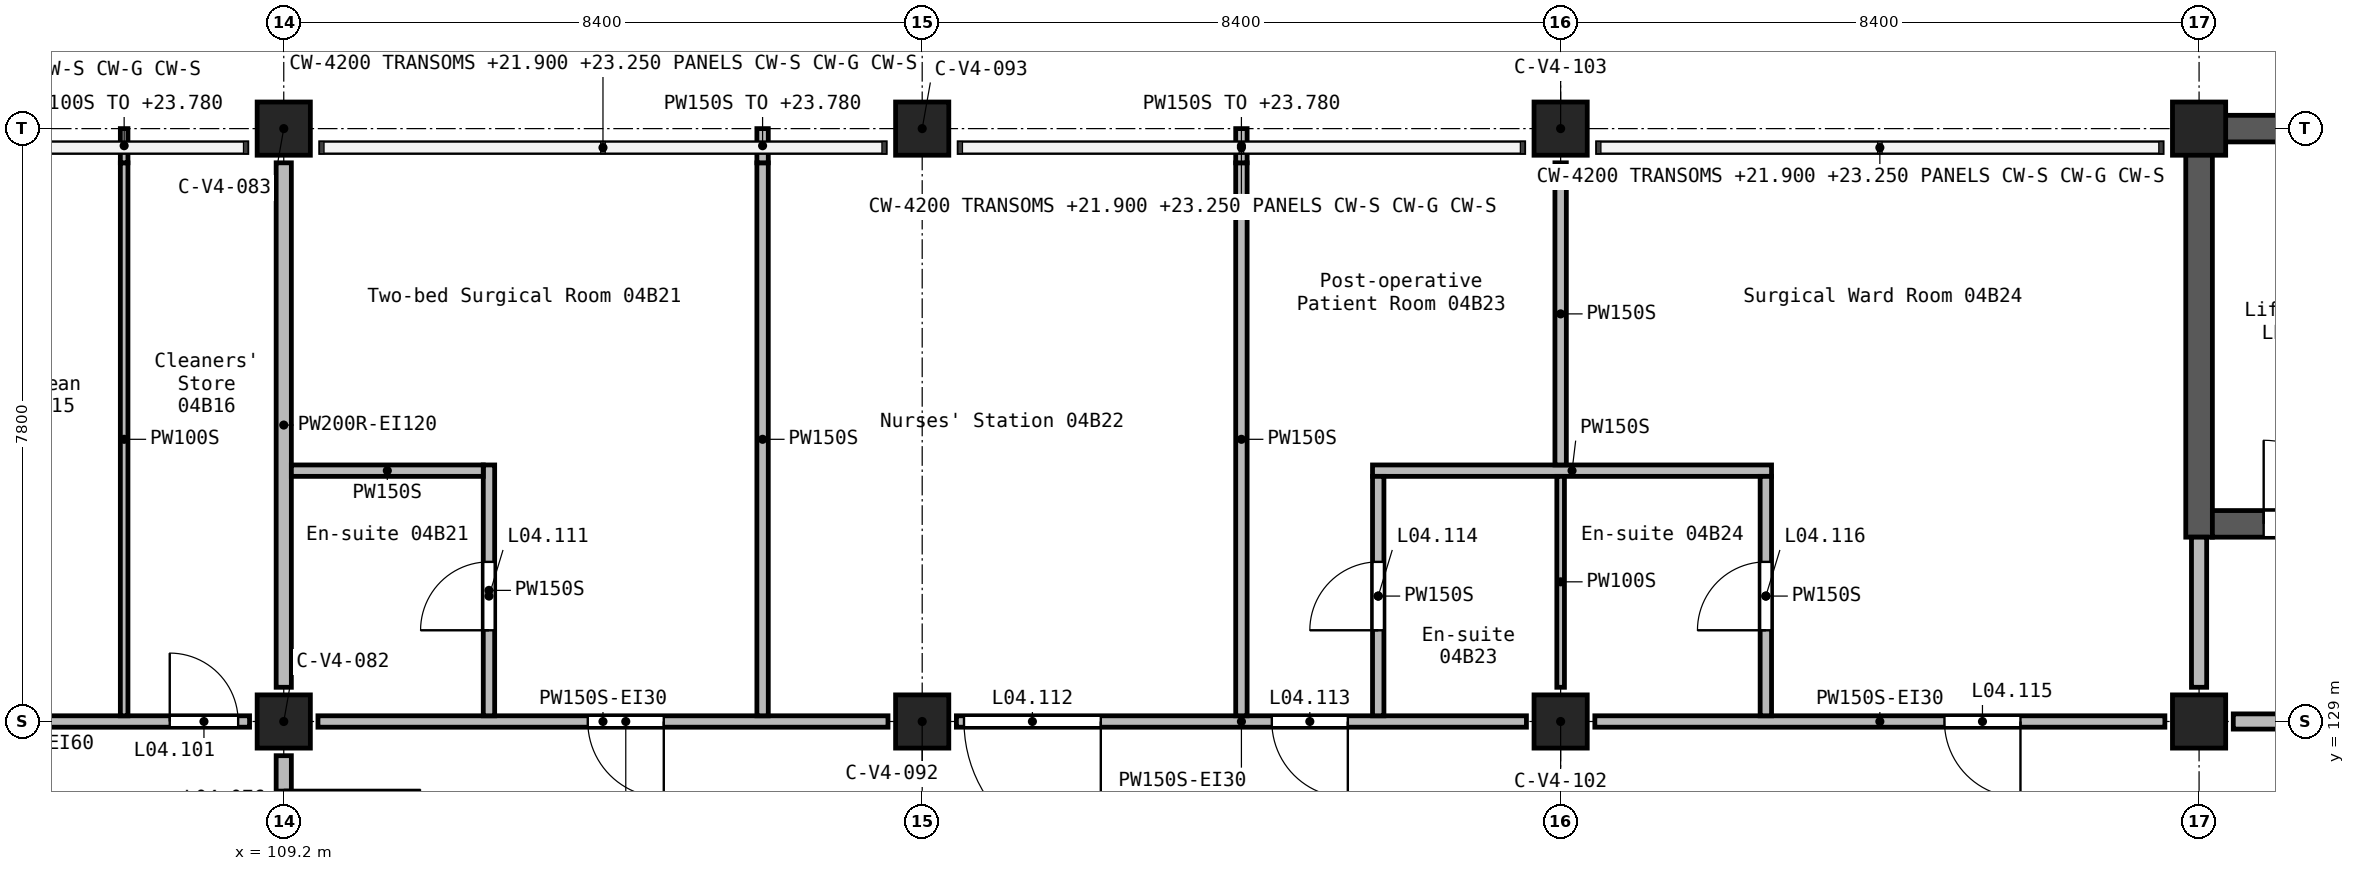
"""IFC4 building model, lengths in metres.
Left out: names, types, materials, properties, quantities, classifications, styles, units other than length and angle.
Written with IfcOpenShell. Run it as: python <this file> out.ifc"""

import sys

from ifc_helpers import new_model, si_unit, direction, frame, frame_2d, origin, origin_2d, place, context, subcontext, project, spatial, rectangle, extrude, element, fill, save


model = new_model("IFC4")
c1 = context("Model", 3, precision=1e-05, world=origin(), true_north=direction((0.0, 1.0)))
c2 = subcontext(c1, "Body", "Model", "MODEL_VIEW")
j1 = project(units=[si_unit("LENGTHUNIT", "METRE"), si_unit("PLANEANGLEUNIT", "RADIAN")], contexts=[c1])
p1 = place(None, origin())
s1 = spatial("IfcSite", under=j1, at=p1, CompositionType="ELEMENT")
p2 = place(p1, origin())
s2 = spatial("IfcBuilding", under=s1, at=p2, CompositionType="ELEMENT")
p3 = place(p2, frame((0.0, 0.0, 21.0)))
s3 = spatial("IfcBuildingStorey", under=s2, at=p3, CompositionType="ELEMENT", Elevation=21.0)
for number, where, z_axis, x_axis in (
    (1, (109.2, 129.0, 0.0), (0.0, 0.0, 1.0), (1.0, 0.0, 0.0)),
    (2, (109.2, 136.8, 0.0), (0.0, 0.0, 1.0), (1.0, 0.0, 0.0)),
    (3, (117.6, 129.0, 0.0), (0.0, 0.0, 1.0), (1.0, 0.0, 0.0)),
    (4, (117.6, 136.8, 0.0), (0.0, 0.0, 1.0), (1.0, 0.0, 0.0)),
    (5, (126.0, 129.0, 0.0), (0.0, 0.0, 1.0), (1.0, 0.0, 0.0)),
    (6, (126.0, 136.8, 0.0), (0.0, 0.0, 1.0), (1.0, 0.0, 0.0)),
    (7, (134.4, 129.0, 0.0), (0.0, 0.0, 1.0), (1.0, 0.0, 0.0)),
    (8, (134.4, 136.8, 0.0), (0.0, 0.0, 1.0), (1.0, 0.0, 0.0)),
):
    element("IfcColumn", number, at=place(p3, frame(where, z_axis=z_axis, x_axis=x_axis)), inside=s3, PredefinedType="COLUMN", context=c2, shape_type="SweptSolid", body=[
        extrude(rectangle(XDim=0.7, YDim=0.7, at=origin_2d()), origin(), (0.0, 0.0, 1.0), 3.9),
    ])
p4 = place(p3, frame((134.225, 136.8, 0.0), z_axis=(0.0, 0.0, 1.0), x_axis=(1.0, 0.0, 0.0)))
e9 = element("IfcWall", 9, at=p4, inside=s3, PredefinedType="SHEAR", context=c2, shape_type="SweptSolid", body=[
    extrude(rectangle(XDim=2.975, YDim=0.35, at=frame_2d((1.487, 0.0))), origin(), (0.0, 0.0, 1.0), 3.9),
])
p5 = place(p3, frame((134.4, 131.425, 0.0), z_axis=(0.0, 0.0, 1.0), x_axis=(0.0, 1.0, 0.0)))
e10 = element("IfcWall", 10, at=p5, inside=s3, PredefinedType="SHEAR", context=c2, shape_type="SweptSolid", body=[
    extrude(rectangle(XDim=5.2, YDim=0.35, at=frame_2d((2.6, 0.0))), origin(), (0.0, 0.0, 1.0), 3.9),
])
p6 = place(p3, frame((134.575, 131.6, 0.0), z_axis=(0.0, 0.0, 1.0), x_axis=(1.0, 0.0, 0.0)))
e11 = element("IfcWall", 11, at=p6, inside=s3, PredefinedType="SHEAR", context=c2, shape_type="SweptSolid", body=[
    extrude(rectangle(XDim=2.625, YDim=0.35, at=frame_2d((1.312, 0.0))), origin(), (0.0, 0.0, 1.0), 3.9),
])
p7 = place(p6, frame((0.675, 0.0, 0.0)))
e12 = element("IfcOpeningElement", 12, at=p7, cuts=e11, PredefinedType="OPENING", context=c2, shape_type="SweptSolid", body=[
    extrude(rectangle(XDim=1.1, YDim=2.1, at=frame_2d((0.55, 1.05))), frame((0.0, 0.185, 0.0), z_axis=(0.0, -1.0, 0.0), x_axis=(1.0, 0.0, 0.0)), (0.0, 0.0, 1.0), 0.37),
])
p8 = place(p3, frame((109.2, 136.35, 0.0), z_axis=(0.0, 0.0, 1.0), x_axis=(0.0, -1.0, 0.0)))
e13 = element("IfcWall", 13, at=p8, inside=s3, PredefinedType="SOLIDWALL", context=c2, shape_type="SweptSolid", body=[
    extrude(rectangle(XDim=6.9, YDim=0.2, at=frame_2d((3.45, 0.0))), origin(), (0.0, 0.0, 1.0), 3.6),
])
p9 = place(p3, frame((109.2, 128.55, 0.0), z_axis=(0.0, 0.0, 1.0), x_axis=(0.0, -1.0, 0.0)))
e14 = element("IfcWall", 14, at=p9, inside=s3, PredefinedType="SOLIDWALL", context=c2, shape_type="SweptSolid", body=[
    extrude(rectangle(XDim=2.7, YDim=0.2, at=frame_2d((1.35, 0.0))), origin(), (0.0, 0.0, 1.0), 3.6),
])
p10 = place(p9, frame((0.45, 0.0, 0.0)))
e15 = element("IfcOpeningElement", 15, at=p10, cuts=e14, PredefinedType="OPENING", context=c2, shape_type="SweptSolid", body=[
    extrude(rectangle(XDim=1.8, YDim=2.1, at=frame_2d((0.9, 1.05))), frame((0.0, 0.11, 0.0), z_axis=(0.0, -1.0, 0.0), x_axis=(1.0, 0.0, 0.0)), (0.0, 0.0, 1.0), 0.22),
])
p11 = place(p3, frame((134.85, 129.0, 0.0), z_axis=(0.0, 0.0, 1.0), x_axis=(1.0, 0.0, 0.0)))
e16 = element("IfcWall", 16, at=p11, inside=s3, PredefinedType="SOLIDWALL", context=c2, shape_type="SweptSolid", body=[
    extrude(rectangle(XDim=7.5, YDim=0.2, at=frame_2d((3.75, 0.0))), origin(), (0.0, 0.0, 1.0), 3.6),
])
p12 = place(p11, frame((2.85, 0.0, 0.0)))
e17 = element("IfcOpeningElement", 17, at=p12, cuts=e16, PredefinedType="OPENING", context=c2, shape_type="SweptSolid", body=[
    extrude(rectangle(XDim=1.8, YDim=2.1, at=frame_2d((0.9, 1.05))), frame((0.0, 0.11, 0.0), z_axis=(0.0, -1.0, 0.0), x_axis=(1.0, 0.0, 0.0)), (0.0, 0.0, 1.0), 0.22),
])
p13 = place(p3, frame((134.4, 129.45, 0.0), z_axis=(0.0, 0.0, 1.0), x_axis=(0.0, 1.0, 0.0)))
e18 = element("IfcWall", 18, at=p13, inside=s3, PredefinedType="SOLIDWALL", context=c2, shape_type="SweptSolid", body=[
    extrude(rectangle(XDim=1.975, YDim=0.2, at=frame_2d((0.988, 0.0))), origin(), (0.0, 0.0, 1.0), 3.6),
])
p14 = place(p3, frame((133.95, 129.0, 0.0), z_axis=(0.0, 0.0, 1.0), x_axis=(-1.0, 0.0, 0.0)))
e19 = element("IfcWall", 19, at=p14, inside=s3, PredefinedType="PARTITIONING", context=c2, shape_type="SweptSolid", body=[
    extrude(rectangle(XDim=7.5, YDim=0.15, at=frame_2d((3.75, 0.0))), origin(), (0.0, 0.0, 1.0), 3.6),
])
p15 = place(p14, frame((1.9, 0.0, 0.0)))
e20 = element("IfcOpeningElement", 20, at=p15, cuts=e19, PredefinedType="OPENING", context=c2, shape_type="SweptSolid", body=[
    extrude(rectangle(XDim=1.0, YDim=2.1, at=frame_2d((0.5, 1.05))), frame((0.0, 0.085, 0.0), z_axis=(0.0, -1.0, 0.0), x_axis=(1.0, 0.0, 0.0)), (0.0, 0.0, 1.0), 0.17),
])
p16 = place(p3, frame((125.55, 129.0, 0.0), z_axis=(0.0, 0.0, 1.0), x_axis=(-1.0, 0.0, 0.0)))
e21 = element("IfcWall", 21, at=p16, inside=s3, PredefinedType="PARTITIONING", context=c2, shape_type="SweptSolid", body=[
    extrude(rectangle(XDim=7.5, YDim=0.15, at=frame_2d((3.75, 0.0))), origin(), (0.0, 0.0, 1.0), 3.6),
])
p17 = place(p16, frame((5.6, 0.0, 0.0)))
e22 = element("IfcOpeningElement", 22, at=p17, cuts=e21, PredefinedType="OPENING", context=c2, shape_type="SweptSolid", body=[
    extrude(rectangle(XDim=1.8, YDim=2.1, at=frame_2d((0.9, 1.05))), frame((0.0, 0.085, 0.0), z_axis=(0.0, -1.0, 0.0), x_axis=(1.0, 0.0, 0.0)), (0.0, 0.0, 1.0), 0.17),
])
p18 = place(p16, frame((2.35, 0.0, 0.0)))
e23 = element("IfcOpeningElement", 23, at=p18, cuts=e21, PredefinedType="OPENING", context=c2, shape_type="SweptSolid", body=[
    extrude(rectangle(XDim=1.0, YDim=2.1, at=frame_2d((0.5, 1.05))), frame((0.0, 0.085, 0.0), z_axis=(0.0, -1.0, 0.0), x_axis=(1.0, 0.0, 0.0)), (0.0, 0.0, 1.0), 0.17),
])
p19 = place(p3, frame((117.15, 129.0, 0.0), z_axis=(0.0, 0.0, 1.0), x_axis=(-1.0, 0.0, 0.0)))
e24 = element("IfcWall", 24, at=p19, inside=s3, PredefinedType="PARTITIONING", context=c2, shape_type="SweptSolid", body=[
    extrude(rectangle(XDim=7.5, YDim=0.15, at=frame_2d((3.75, 0.0))), origin(), (0.0, 0.0, 1.0), 3.6),
])
p20 = place(p19, frame((2.95, 0.0, 0.0)))
e25 = element("IfcOpeningElement", 25, at=p20, cuts=e24, PredefinedType="OPENING", context=c2, shape_type="SweptSolid", body=[
    extrude(rectangle(XDim=1.0, YDim=2.1, at=frame_2d((0.5, 1.05))), frame((0.0, 0.085, 0.0), z_axis=(0.0, -1.0, 0.0), x_axis=(1.0, 0.0, 0.0)), (0.0, 0.0, 1.0), 0.17),
])
p21 = place(p3, frame((102.975, 129.0, 0.0), z_axis=(0.0, 0.0, 1.0), x_axis=(1.0, 0.0, 0.0)))
e26 = element("IfcWall", 26, at=p21, inside=s3, PredefinedType="PARTITIONING", context=c2, shape_type="SweptSolid", body=[
    extrude(rectangle(XDim=5.775, YDim=0.15, at=frame_2d((2.887, 0.0))), origin(), (0.0, 0.0, 1.0), 3.6),
])
p22 = place(p21, frame((1.525, 0.0, 0.0)))
e27 = element("IfcOpeningElement", 27, at=p22, cuts=e26, PredefinedType="OPENING", context=c2, shape_type="SweptSolid", body=[
    extrude(rectangle(XDim=1.0, YDim=2.1, at=frame_2d((0.5, 1.05))), frame((0.0, 0.085, 0.0), z_axis=(0.0, -1.0, 0.0), x_axis=(1.0, 0.0, 0.0)), (0.0, 0.0, 1.0), 0.17),
])
p23 = place(p21, frame((4.725, 0.0, 0.0)))
e28 = element("IfcOpeningElement", 28, at=p23, cuts=e26, PredefinedType="OPENING", context=c2, shape_type="SweptSolid", body=[
    extrude(rectangle(XDim=0.9, YDim=2.1, at=frame_2d((0.45, 1.05))), frame((0.0, 0.085, 0.0), z_axis=(0.0, -1.0, 0.0), x_axis=(1.0, 0.0, 0.0)), (0.0, 0.0, 1.0), 0.17),
])
p24 = place(p3, frame((115.5, 129.075, 0.0), z_axis=(0.0, 0.0, 1.0), x_axis=(0.0, 1.0, 0.0)))
e29 = element("IfcWall", 29, at=p24, inside=s3, PredefinedType="PARTITIONING", context=c2, shape_type="SweptSolid", body=[
    extrude(rectangle(XDim=7.275, YDim=0.15, at=frame_2d((3.638, 0.0))), origin(), (0.0, 0.0, 1.0), 3.6),
])
p25 = place(p3, frame((115.5, 136.35, 0.0), z_axis=(0.0, 0.0, 1.0), x_axis=(0.0, 1.0, 0.0)))
e30 = element("IfcWall", 30, at=p25, inside=s3, PredefinedType="PARTITIONING", context=c2, shape_type="SweptSolid", body=[
    extrude(rectangle(XDim=0.45, YDim=0.15, at=frame_2d((0.225, 0.0))), origin(), (0.0, 0.0, 1.0), 2.78),
])
p26 = place(p3, frame((121.8, 129.075, 0.0), z_axis=(0.0, 0.0, 1.0), x_axis=(0.0, 1.0, 0.0)))
e31 = element("IfcWall", 31, at=p26, inside=s3, PredefinedType="PARTITIONING", context=c2, shape_type="SweptSolid", body=[
    extrude(rectangle(XDim=7.275, YDim=0.15, at=frame_2d((3.638, 0.0))), origin(), (0.0, 0.0, 1.0), 3.6),
])
p27 = place(p3, frame((121.8, 136.35, 0.0), z_axis=(0.0, 0.0, 1.0), x_axis=(0.0, 1.0, 0.0)))
e32 = element("IfcWall", 32, at=p27, inside=s3, PredefinedType="PARTITIONING", context=c2, shape_type="SweptSolid", body=[
    extrude(rectangle(XDim=0.45, YDim=0.15, at=frame_2d((0.225, 0.0))), origin(), (0.0, 0.0, 1.0), 2.78),
])
p28 = place(p3, frame((123.525, 132.3, 0.0), z_axis=(0.0, 0.0, 1.0), x_axis=(1.0, 0.0, 0.0)))
e33 = element("IfcWall", 33, at=p28, inside=s3, PredefinedType="PARTITIONING", context=c2, shape_type="SweptSolid", body=[
    extrude(rectangle(XDim=5.25, YDim=0.15, at=frame_2d((2.625, 0.0))), origin(), (0.0, 0.0, 1.0), 3.6),
])
p29 = place(p3, frame((126.0, 132.375, 0.0), z_axis=(0.0, 0.0, 1.0), x_axis=(0.0, 1.0, 0.0)))
e34 = element("IfcWall", 34, at=p29, inside=s3, PredefinedType="PARTITIONING", context=c2, shape_type="SweptSolid", body=[
    extrude(rectangle(XDim=3.975, YDim=0.15, at=frame_2d((1.988, 0.0))), origin(), (0.0, 0.0, 1.0), 3.6),
])
p30 = place(p3, frame((111.9, 129.075, 0.0), z_axis=(0.0, 0.0, 1.0), x_axis=(0.0, 1.0, 0.0)))
e35 = element("IfcWall", 35, at=p30, inside=s3, PredefinedType="PARTITIONING", context=c2, shape_type="SweptSolid", body=[
    extrude(rectangle(XDim=3.3, YDim=0.15, at=frame_2d((1.65, 0.0))), origin(), (0.0, 0.0, 1.0), 3.6),
])
p31 = place(p30, frame((1.125, 0.0, 0.0)))
e36 = element("IfcOpeningElement", 36, at=p31, cuts=e35, PredefinedType="OPENING", context=c2, shape_type="SweptSolid", body=[
    extrude(rectangle(XDim=0.9, YDim=2.1, at=frame_2d((0.45, 1.05))), frame((0.0, 0.085, 0.0), z_axis=(0.0, -1.0, 0.0), x_axis=(1.0, 0.0, 0.0)), (0.0, 0.0, 1.0), 0.17),
])
p32 = place(p3, frame((123.6, 129.075, 0.0), z_axis=(0.0, 0.0, 1.0), x_axis=(0.0, 1.0, 0.0)))
e37 = element("IfcWall", 37, at=p32, inside=s3, PredefinedType="PARTITIONING", context=c2, shape_type="SweptSolid", body=[
    extrude(rectangle(XDim=3.15, YDim=0.15, at=frame_2d((1.575, 0.0))), origin(), (0.0, 0.0, 1.0), 3.6),
])
p33 = place(p32, frame((1.125, 0.0, 0.0)))
e38 = element("IfcOpeningElement", 38, at=p33, cuts=e37, PredefinedType="OPENING", context=c2, shape_type="SweptSolid", body=[
    extrude(rectangle(XDim=0.9, YDim=2.1, at=frame_2d((0.45, 1.05))), frame((0.0, 0.085, 0.0), z_axis=(0.0, -1.0, 0.0), x_axis=(1.0, 0.0, 0.0)), (0.0, 0.0, 1.0), 0.17),
])
p34 = place(p3, frame((128.7, 129.075, 0.0), z_axis=(0.0, 0.0, 1.0), x_axis=(0.0, 1.0, 0.0)))
e39 = element("IfcWall", 39, at=p34, inside=s3, PredefinedType="PARTITIONING", context=c2, shape_type="SweptSolid", body=[
    extrude(rectangle(XDim=3.15, YDim=0.15, at=frame_2d((1.575, 0.0))), origin(), (0.0, 0.0, 1.0), 3.6),
])
p35 = place(p34, frame((1.125, 0.0, 0.0)))
e40 = element("IfcOpeningElement", 40, at=p35, cuts=e39, PredefinedType="OPENING", context=c2, shape_type="SweptSolid", body=[
    extrude(rectangle(XDim=0.9, YDim=2.1, at=frame_2d((0.45, 1.05))), frame((0.0, 0.085, 0.0), z_axis=(0.0, -1.0, 0.0), x_axis=(1.0, 0.0, 0.0)), (0.0, 0.0, 1.0), 0.17),
])
p36 = place(p3, frame((109.3, 132.3, 0.0), z_axis=(0.0, 0.0, 1.0), x_axis=(1.0, 0.0, 0.0)))
e41 = element("IfcWall", 41, at=p36, inside=s3, PredefinedType="PARTITIONING", context=c2, shape_type="SweptSolid", body=[
    extrude(rectangle(XDim=2.525, YDim=0.15, at=frame_2d((1.262, 0.0))), origin(), (0.0, 0.0, 1.0), 3.6),
])
p37 = place(p3, frame((107.1, 129.075, 0.0), z_axis=(0.0, 0.0, 1.0), x_axis=(0.0, 1.0, 0.0)))
e42 = element("IfcWall", 42, at=p37, inside=s3, PredefinedType="PARTITIONING", context=c2, shape_type="SweptSolid", body=[
    extrude(rectangle(XDim=7.275, YDim=0.1, at=frame_2d((3.638, 0.0))), origin(), (0.0, 0.0, 1.0), 3.6),
])
p38 = place(p3, frame((107.1, 136.35, 0.0), z_axis=(0.0, 0.0, 1.0), x_axis=(0.0, 1.0, 0.0)))
e43 = element("IfcWall", 43, at=p38, inside=s3, PredefinedType="PARTITIONING", context=c2, shape_type="SweptSolid", body=[
    extrude(rectangle(XDim=0.45, YDim=0.1, at=frame_2d((0.225, 0.0))), origin(), (0.0, 0.0, 1.0), 2.78),
])
p39 = place(p3, frame((126.0, 129.45, 0.0), z_axis=(0.0, 0.0, 1.0), x_axis=(0.0, 1.0, 0.0)))
e44 = element("IfcWall", 44, at=p39, inside=s3, PredefinedType="PARTITIONING", context=c2, shape_type="SweptSolid", body=[
    extrude(rectangle(XDim=2.775, YDim=0.1, at=frame_2d((1.388, 0.0))), origin(), (0.0, 0.0, 1.0), 3.6),
])
p40 = place(p10, origin())
e45 = element("IfcDoor", 45, at=p40, inside=s3, OperationType="DOUBLE_DOOR_SINGLE_SWING", PredefinedType="DOOR", context=c2, shape_type="SweptSolid", body=[
    extrude(rectangle(XDim=1.8, YDim=2.1, at=frame_2d((0.9, 1.05))), frame((0.0, 0.025, 0.0), z_axis=(0.0, -1.0, 0.0), x_axis=(1.0, 0.0, 0.0)), (0.0, 0.0, 1.0), 0.05),
])
fill(e15, e45)
p41 = place(p23, origin())
e46 = element("IfcDoor", 46, at=p41, inside=s3, OperationType="SINGLE_SWING_RIGHT", PredefinedType="DOOR", context=c2, shape_type="SweptSolid", body=[
    extrude(rectangle(XDim=0.9, YDim=2.1, at=frame_2d((0.45, 1.05))), frame((0.0, 0.025, 0.0), z_axis=(0.0, -1.0, 0.0), x_axis=(1.0, 0.0, 0.0)), (0.0, 0.0, 1.0), 0.05),
])
fill(e28, e46)
p42 = place(p20, frame((1.0, 0.0, 0.0), z_axis=(0.0, 0.0, 1.0), x_axis=(-1.0, 0.0, 0.0)))
e47 = element("IfcDoor", 47, at=p42, inside=s3, OperationType="SINGLE_SWING_RIGHT", PredefinedType="DOOR", context=c2, shape_type="SweptSolid", body=[
    extrude(rectangle(XDim=1.0, YDim=2.1, at=frame_2d((0.5, 1.05))), frame((0.0, 0.025, 0.0), z_axis=(0.0, -1.0, 0.0), x_axis=(1.0, 0.0, 0.0)), (0.0, 0.0, 1.0), 0.05),
])
fill(e25, e47)
p43 = place(p31, origin())
e48 = element("IfcDoor", 48, at=p43, inside=s3, OperationType="SINGLE_SWING_LEFT", PredefinedType="DOOR", context=c2, shape_type="SweptSolid", body=[
    extrude(rectangle(XDim=0.9, YDim=2.1, at=frame_2d((0.45, 1.05))), frame((0.0, 0.025, 0.0), z_axis=(0.0, -1.0, 0.0), x_axis=(1.0, 0.0, 0.0)), (0.0, 0.0, 1.0), 0.05),
])
fill(e36, e48)
p44 = place(p17, frame((1.8, 0.0, 0.0), z_axis=(0.0, 0.0, 1.0), x_axis=(-1.0, 0.0, 0.0)))
e49 = element("IfcDoor", 49, at=p44, inside=s3, OperationType="DOUBLE_DOOR_SINGLE_SWING", PredefinedType="DOOR", context=c2, shape_type="SweptSolid", body=[
    extrude(rectangle(XDim=1.8, YDim=2.1, at=frame_2d((0.9, 1.05))), frame((0.0, 0.025, 0.0), z_axis=(0.0, -1.0, 0.0), x_axis=(1.0, 0.0, 0.0)), (0.0, 0.0, 1.0), 0.05),
])
fill(e22, e49)
p45 = place(p18, frame((1.0, 0.0, 0.0), z_axis=(0.0, 0.0, 1.0), x_axis=(-1.0, 0.0, 0.0)))
e50 = element("IfcDoor", 50, at=p45, inside=s3, OperationType="SINGLE_SWING_RIGHT", PredefinedType="DOOR", context=c2, shape_type="SweptSolid", body=[
    extrude(rectangle(XDim=1.0, YDim=2.1, at=frame_2d((0.5, 1.05))), frame((0.0, 0.025, 0.0), z_axis=(0.0, -1.0, 0.0), x_axis=(1.0, 0.0, 0.0)), (0.0, 0.0, 1.0), 0.05),
])
fill(e23, e50)
p46 = place(p33, frame((0.9, 0.0, 0.0), z_axis=(0.0, 0.0, 1.0), x_axis=(-1.0, 0.0, 0.0)))
e51 = element("IfcDoor", 51, at=p46, inside=s3, OperationType="SINGLE_SWING_LEFT", PredefinedType="DOOR", context=c2, shape_type="SweptSolid", body=[
    extrude(rectangle(XDim=0.9, YDim=2.1, at=frame_2d((0.45, 1.05))), frame((0.0, 0.025, 0.0), z_axis=(0.0, -1.0, 0.0), x_axis=(1.0, 0.0, 0.0)), (0.0, 0.0, 1.0), 0.05),
])
fill(e38, e51)
p47 = place(p15, frame((1.0, 0.0, 0.0), z_axis=(0.0, 0.0, 1.0), x_axis=(-1.0, 0.0, 0.0)))
e52 = element("IfcDoor", 52, at=p47, inside=s3, OperationType="SINGLE_SWING_RIGHT", PredefinedType="DOOR", context=c2, shape_type="SweptSolid", body=[
    extrude(rectangle(XDim=1.0, YDim=2.1, at=frame_2d((0.5, 1.05))), frame((0.0, 0.025, 0.0), z_axis=(0.0, -1.0, 0.0), x_axis=(1.0, 0.0, 0.0)), (0.0, 0.0, 1.0), 0.05),
])
fill(e20, e52)
p48 = place(p35, origin())
e53 = element("IfcDoor", 53, at=p48, inside=s3, OperationType="SINGLE_SWING_RIGHT", PredefinedType="DOOR", context=c2, shape_type="SweptSolid", body=[
    extrude(rectangle(XDim=0.9, YDim=2.1, at=frame_2d((0.45, 1.05))), frame((0.0, 0.025, 0.0), z_axis=(0.0, -1.0, 0.0), x_axis=(1.0, 0.0, 0.0)), (0.0, 0.0, 1.0), 0.05),
])
fill(e40, e53)
p49 = place(p7, origin())
e54 = element("IfcDoor", 54, at=p49, inside=s3, OperationType="DOUBLE_DOOR_SLIDING", PredefinedType="DOOR", context=c2, shape_type="SweptSolid", body=[
    extrude(rectangle(XDim=1.1, YDim=2.1, at=frame_2d((0.55, 1.05))), frame((0.0, 0.025, 0.0), z_axis=(0.0, -1.0, 0.0), x_axis=(1.0, 0.0, 0.0)), (0.0, 0.0, 1.0), 0.05),
])
fill(e12, e54)
save(model, sys.argv[1])
